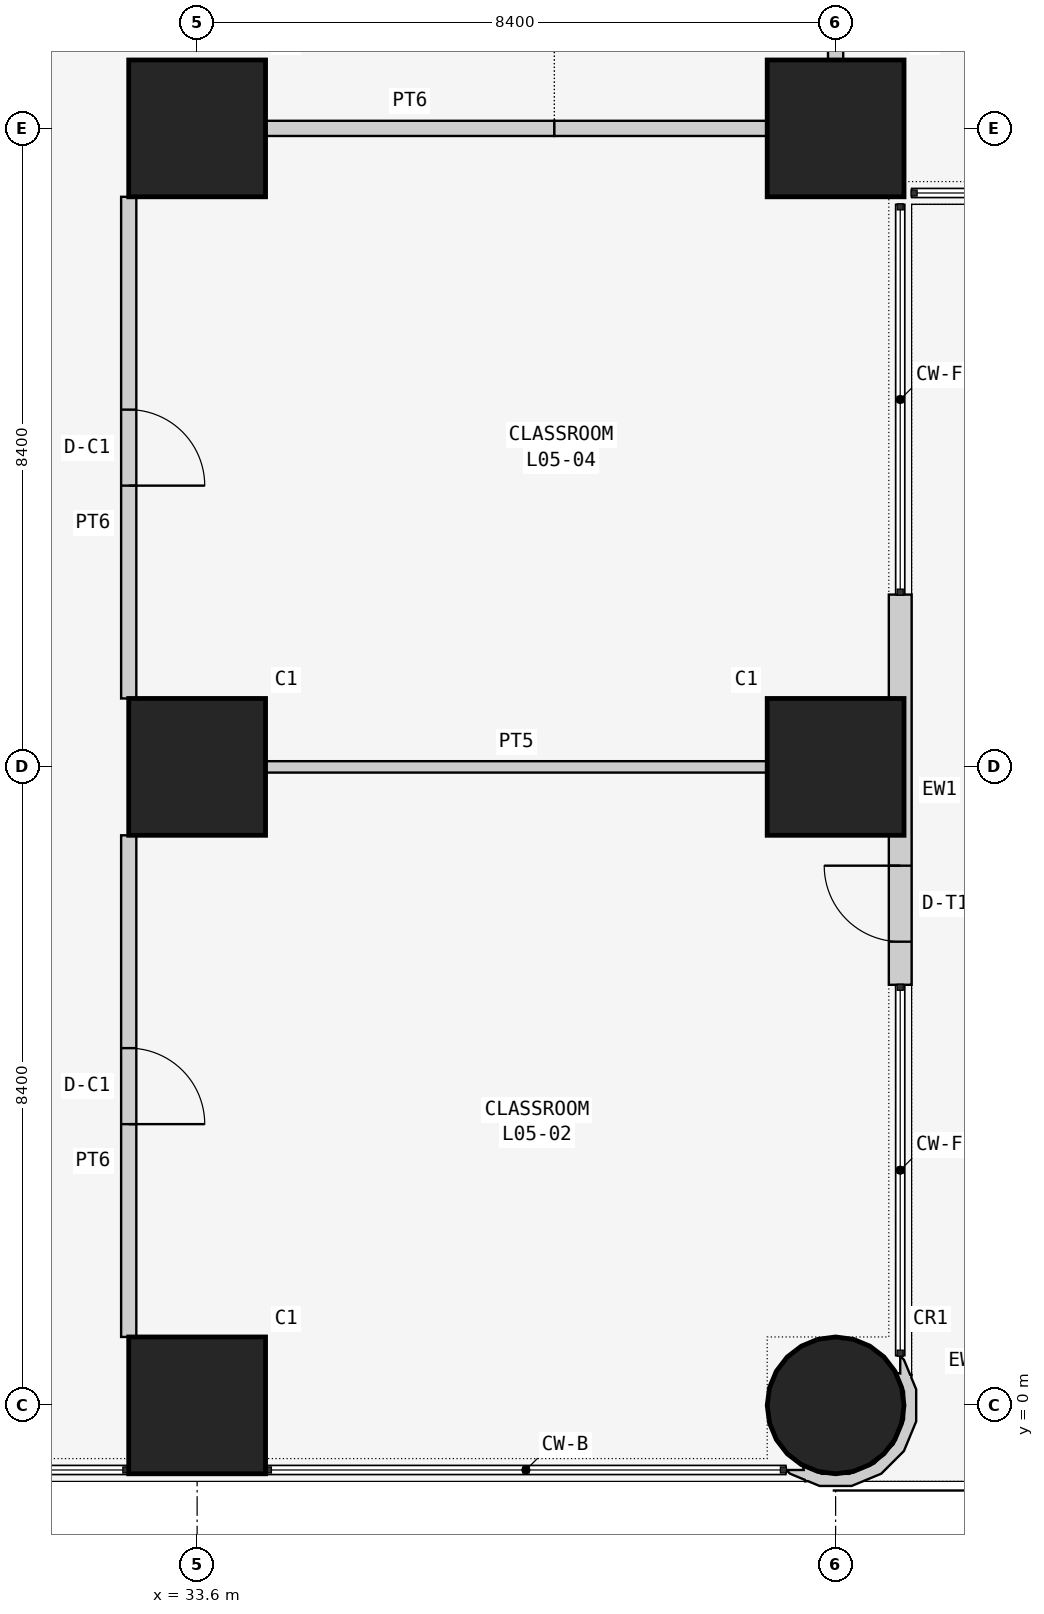
"""IFC4 building model, lengths in metres.
Left out: names, types, materials, properties, quantities, classifications, styles, units other than length and angle.
Written with IfcOpenShell. Run it as: python <this file> out.ifc"""

import sys

from ifc_helpers import new_model, si_unit, direction, frame, frame_2d, origin, origin_2d, place, context, subcontext, project, spatial, polyline, rectangle, circle, outline, extrude, element, fill, save


model = new_model("IFC4")
c1 = context("Model", 3, precision=1e-05, world=origin(), true_north=direction((0.0, 1.0)))
c2 = subcontext(c1, "Body", "Model", "MODEL_VIEW")
j1 = project(units=[si_unit("LENGTHUNIT", "METRE"), si_unit("PLANEANGLEUNIT", "RADIAN")], contexts=[c1])
p1 = place(None, origin())
s1 = spatial("IfcSite", under=j1, at=p1, CompositionType="ELEMENT")
p2 = place(p1, origin())
s2 = spatial("IfcBuilding", under=s1, at=p2, CompositionType="ELEMENT")
p3 = place(p2, frame((0.0, 0.0, 24.0)))
s3 = spatial("IfcBuildingStorey", under=s2, at=p3, CompositionType="ELEMENT", Elevation=24.0)
for number, where, z_axis, x_axis in (
    (1, (33.6, 0.0, 0.0), (0.0, 0.0, 1.0), (1.0, 0.0, 0.0)),
    (2, (33.6, 8.4, 0.0), (0.0, 0.0, 1.0), (1.0, 0.0, 0.0)),
    (3, (33.6, 16.8, 0.0), (0.0, 0.0, 1.0), (1.0, 0.0, 0.0)),
):
    element("IfcColumn", number, at=place(p3, frame(where, z_axis=z_axis, x_axis=x_axis)), inside=s3, PredefinedType="COLUMN", context=c2, shape_type="SweptSolid", body=[
        extrude(rectangle(XDim=1.8, YDim=1.8, at=origin_2d()), origin(), (0.0, 0.0, 1.0), 4.5),
    ])
p4 = place(p3, frame((42.0, 0.0, 0.0), z_axis=(0.0, 0.0, 1.0), x_axis=(1.0, 0.0, 0.0)))
e4 = element("IfcColumn", 4, at=p4, inside=s3, PredefinedType="COLUMN", context=c2, shape_type="SweptSolid", body=[
    extrude(circle(Radius=0.9, at=origin_2d()), origin(), (0.0, 0.0, 1.0), 4.5),
])
for number, where, z_axis, x_axis in (
    (5, (42.0, 8.4, 0.0), (0.0, 0.0, 1.0), (1.0, 0.0, 0.0)),
    (6, (42.0, 16.8, 0.0), (0.0, 0.0, 1.0), (1.0, 0.0, 0.0)),
):
    element("IfcColumn", number, at=place(p3, frame(where, z_axis=z_axis, x_axis=x_axis)), inside=s3, PredefinedType="COLUMN", context=c2, shape_type="SweptSolid", body=[
        extrude(rectangle(XDim=1.8, YDim=1.8, at=origin_2d()), origin(), (0.0, 0.0, 1.0), 4.5),
    ])
p5 = place(p3, frame((42.85, 5.533, 0.0), z_axis=(0.0, 0.0, 1.0), x_axis=(0.0, 1.0, 0.0)))
e7 = element("IfcWall", 7, at=p5, inside=s3, PredefinedType="SOLIDWALL", context=c2, shape_type="SweptSolid", body=[
    extrude(rectangle(XDim=5.134, YDim=0.3, at=frame_2d((2.567, 0.0))), origin(), (0.0, 0.0, 1.0), 4.25),
])
p6 = place(p5, frame((0.567, 0.0, 0.0)))
e8 = element("IfcOpeningElement", 8, at=p6, cuts=e7, PredefinedType="OPENING", context=c2, shape_type="SweptSolid", body=[
    extrude(rectangle(XDim=1.0, YDim=2.4, at=frame_2d((0.5, 1.2))), frame((0.0, 0.16, 0.0), z_axis=(0.0, -1.0, 0.0), x_axis=(1.0, 0.0, 0.0)), (0.0, 0.0, 1.0), 0.32),
])
p7 = place(p3, frame((41.405, -0.779, 0.0), z_axis=(0.0, 0.0, 1.0), x_axis=(0.707106781187, -0.707106781187, 0.0)))
e9 = element("IfcWall", 9, at=p7, inside=s3, PredefinedType="SOLIDWALL", context=c2, shape_type="SweptSolid", body=[
    extrude(outline(polyline([(0.294, 1.961), (0.279, 1.949), (0.081, 2.031), (0.012, 2.031), (0.174, 1.869), (0.133, 1.838), (0.38, 1.735), (0.634, 1.482), (0.771, 1.151), (0.771, 0.792), (0.634, 0.461), (0.38, 0.208), (0.133, 0.105), (0.174, 0.073), (0.012, -0.089), (0.081, -0.089), (0.279, -0.007), (0.294, -0.019), (0.315, 0.008), (0.47, 0.073), (0.768, 0.371), (0.93, 0.76), (0.93, 1.182), (0.768, 1.572), (0.47, 1.87), (0.315, 1.934), (0.294, 1.961)])), origin(), (0.0, 0.0, 1.0), 4.25),
])
p8 = place(p3, frame((34.5, 8.4, 0.0), z_axis=(0.0, 0.0, 1.0), x_axis=(1.0, 0.0, 0.0)))
e10 = element("IfcWall", 10, at=p8, inside=s3, PredefinedType="PARTITIONING", context=c2, shape_type="SweptSolid", body=[
    extrude(rectangle(XDim=6.6, YDim=0.15, at=frame_2d((3.3, 0.0))), origin(), (0.0, 0.0, 1.0), 3.409),
])
p9 = place(p3, frame((32.7, 0.9, 0.0), z_axis=(0.0, 0.0, 1.0), x_axis=(0.0, 1.0, 0.0)))
e11 = element("IfcWall", 11, at=p9, inside=s3, PredefinedType="PARTITIONING", context=c2, shape_type="SweptSolid", body=[
    extrude(rectangle(XDim=6.6, YDim=0.2, at=frame_2d((3.3, 0.0))), origin(), (0.0, 0.0, 1.0), 4.25),
])
p10 = place(p9, frame((2.8, 0.0, 0.0)))
e12 = element("IfcOpeningElement", 12, at=p10, cuts=e11, PredefinedType="OPENING", context=c2, shape_type="SweptSolid", body=[
    extrude(rectangle(XDim=1.0, YDim=2.1, at=frame_2d((0.5, 1.05))), frame((0.0, 0.11, 0.0), z_axis=(0.0, -1.0, 0.0), x_axis=(1.0, 0.0, 0.0)), (0.0, 0.0, 1.0), 0.22),
])
p11 = place(p3, frame((32.7, 9.3, 0.0), z_axis=(0.0, 0.0, 1.0), x_axis=(0.0, 1.0, 0.0)))
e13 = element("IfcWall", 13, at=p11, inside=s3, PredefinedType="PARTITIONING", context=c2, shape_type="SweptSolid", body=[
    extrude(rectangle(XDim=6.6, YDim=0.2, at=frame_2d((3.3, 0.0))), origin(), (0.0, 0.0, 1.0), 4.25),
])
p12 = place(p11, frame((2.8, 0.0, 0.0)))
e14 = element("IfcOpeningElement", 14, at=p12, cuts=e13, PredefinedType="OPENING", context=c2, shape_type="SweptSolid", body=[
    extrude(rectangle(XDim=1.0, YDim=2.1, at=frame_2d((0.5, 1.05))), frame((0.0, 0.11, 0.0), z_axis=(0.0, -1.0, 0.0), x_axis=(1.0, 0.0, 0.0)), (0.0, 0.0, 1.0), 0.22),
])
p13 = place(p3, frame((34.5, 16.8, 0.0), z_axis=(0.0, 0.0, 1.0), x_axis=(1.0, 0.0, 0.0)))
e15 = element("IfcWall", 15, at=p13, inside=s3, PredefinedType="PARTITIONING", context=c2, shape_type="SweptSolid", body=[
    extrude(rectangle(XDim=3.8, YDim=0.2, at=frame_2d((1.9, 0.0))), origin(), (0.0, 0.0, 1.0), 3.409),
])
p14 = place(p3, frame((38.3, 16.8, 0.0), z_axis=(0.0, 0.0, 1.0), x_axis=(1.0, 0.0, 0.0)))
e16 = element("IfcWall", 16, at=p14, inside=s3, PredefinedType="PARTITIONING", context=c2, shape_type="SweptSolid", body=[
    extrude(rectangle(XDim=2.8, YDim=0.2, at=frame_2d((1.4, 0.0))), origin(), (0.0, 0.0, 1.0), 3.409),
])
p15 = place(p3, frame((42.0, 17.7, 0.0), z_axis=(0.0, 0.0, 1.0), x_axis=(0.0, 1.0, 0.0)))
e17 = element("IfcWall", 17, at=p15, inside=s3, PredefinedType="PARTITIONING", context=c2, shape_type="SweptSolid", body=[
    extrude(rectangle(XDim=6.6, YDim=0.2, at=frame_2d((3.3, 0.0))), origin(), (0.0, 0.0, 1.0), 3.409),
])
p16 = place(p6, origin())
e18 = element("IfcDoor", 18, at=p16, inside=s3, OperationType="SINGLE_SWING_RIGHT", PredefinedType="DOOR", context=c2, shape_type="SweptSolid", body=[
    extrude(rectangle(XDim=1.0, YDim=2.4, at=frame_2d((0.5, 1.2))), frame((0.0, 0.025, 0.0), z_axis=(0.0, -1.0, 0.0), x_axis=(1.0, 0.0, 0.0)), (0.0, 0.0, 1.0), 0.05),
])
fill(e8, e18)
p17 = place(p10, frame((1.0, 0.0, 0.0), z_axis=(0.0, 0.0, 1.0), x_axis=(-1.0, 0.0, 0.0)))
e19 = element("IfcDoor", 19, at=p17, inside=s3, OperationType="SINGLE_SWING_RIGHT", PredefinedType="DOOR", context=c2, shape_type="SweptSolid", body=[
    extrude(rectangle(XDim=1.0, YDim=2.1, at=frame_2d((0.5, 1.05))), frame((0.0, 0.025, 0.0), z_axis=(0.0, -1.0, 0.0), x_axis=(1.0, 0.0, 0.0)), (0.0, 0.0, 1.0), 0.05),
])
fill(e12, e19)
p18 = place(p12, frame((1.0, 0.0, 0.0), z_axis=(0.0, 0.0, 1.0), x_axis=(-1.0, 0.0, 0.0)))
e20 = element("IfcDoor", 20, at=p18, inside=s3, OperationType="SINGLE_SWING_RIGHT", PredefinedType="DOOR", context=c2, shape_type="SweptSolid", body=[
    extrude(rectangle(XDim=1.0, YDim=2.1, at=frame_2d((0.5, 1.05))), frame((0.0, 0.025, 0.0), z_axis=(0.0, -1.0, 0.0), x_axis=(1.0, 0.0, 0.0)), (0.0, 0.0, 1.0), 0.05),
])
fill(e14, e20)
save(model, sys.argv[1])
